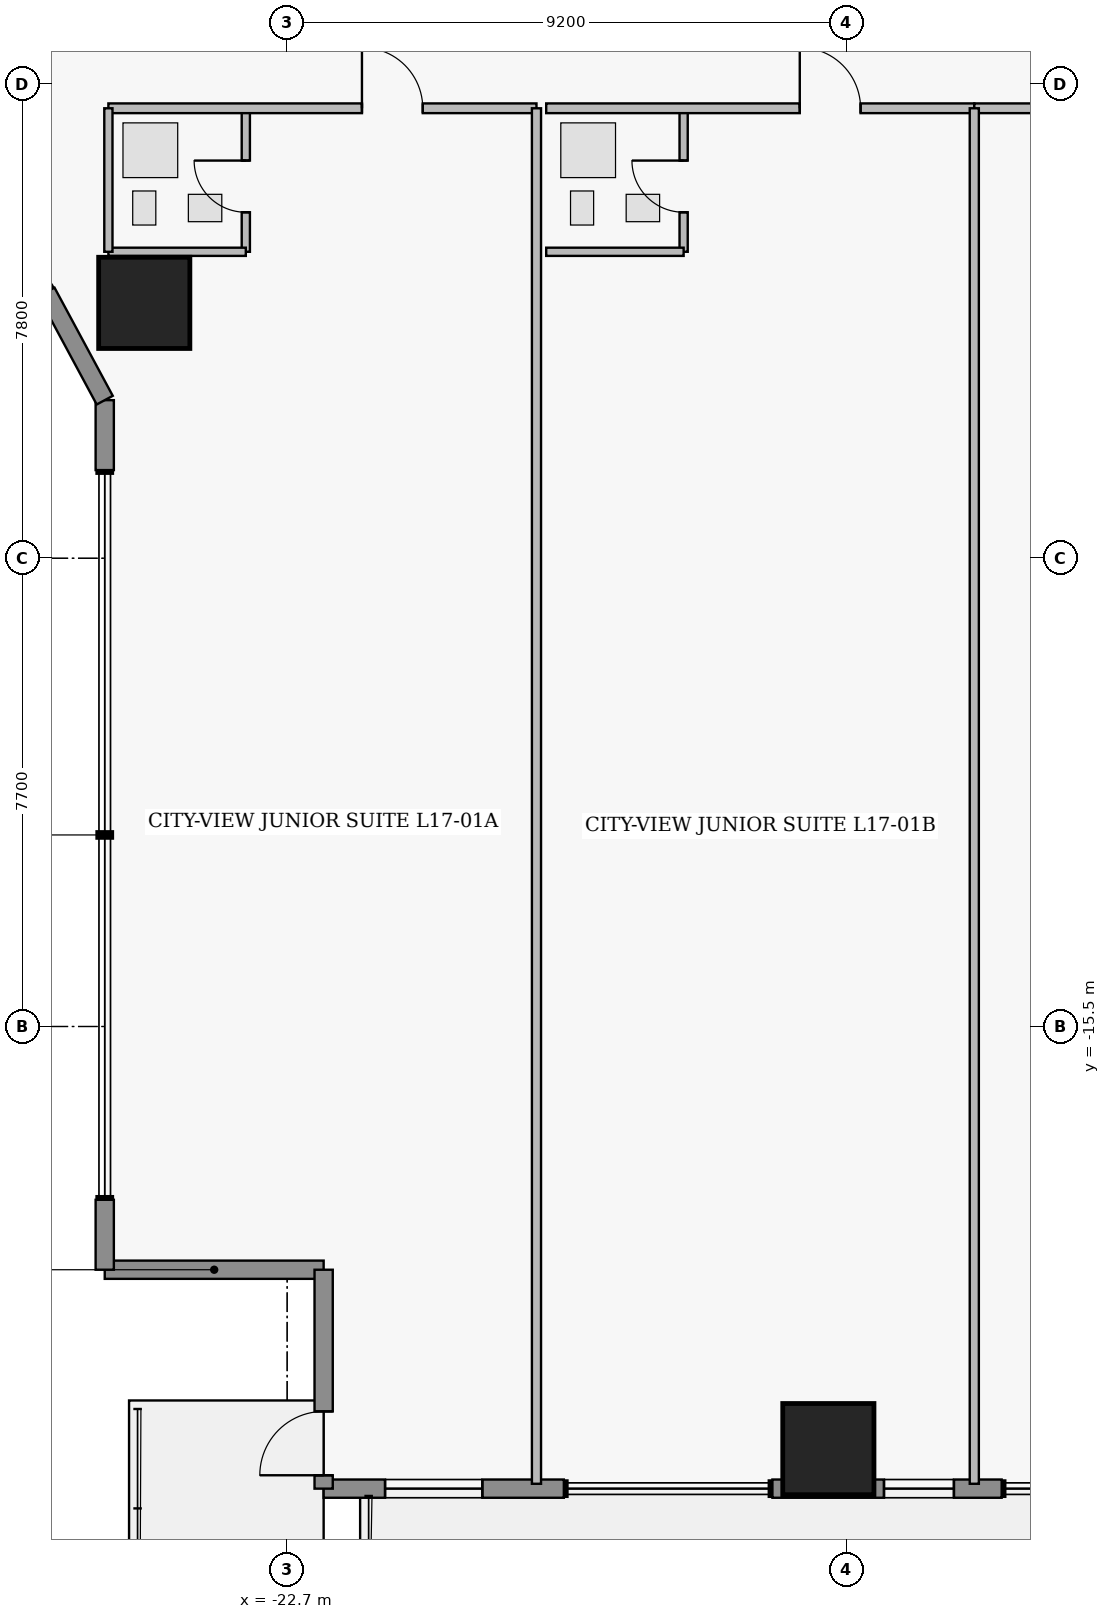
"""IFC4 building model, lengths in metres.
Left out: names, types, materials, properties, quantities, classifications, styles, units other than length and angle.
Written with IfcOpenShell. Run it as: python <this file> out.ifc"""

import sys

from ifc_helpers import new_model, si_unit, direction, frame, frame_2d, origin, origin_2d, place, context, subcontext, project, spatial, rectangle, extrude, element, fill, save


model = new_model("IFC4")
c1 = context("Model", 3, precision=1e-05, world=origin(), true_north=direction((0.0, 1.0)))
c2 = subcontext(c1, "Body", "Model", "MODEL_VIEW")
j1 = project(units=[si_unit("LENGTHUNIT", "METRE"), si_unit("PLANEANGLEUNIT", "RADIAN")], contexts=[c1])
p1 = place(None, origin())
s1 = spatial("IfcSite", under=j1, at=p1, CompositionType="ELEMENT")
p2 = place(p1, origin())
s2 = spatial("IfcBuilding", under=s1, at=p2, CompositionType="ELEMENT")
p3 = place(p2, frame((0.0, 0.0, 71.4)))
s3 = spatial("IfcBuildingStorey", under=s2, at=p3, CompositionType="ELEMENT", Elevation=71.4)
for number, where, z_axis, x_axis in (
    (1, (-13.8, -22.45, 0.0), (0.0, 0.0, 1.0), (1.0, 0.0, 0.0)),
    (2, (-25.05, -3.6, 0.0), (0.0, 0.0, 1.0), (1.0, 0.0, 0.0)),
):
    element("IfcColumn", number, at=place(p3, frame(where, z_axis=z_axis, x_axis=x_axis)), inside=s3, PredefinedType="COLUMN", context=c2, shape_type="SweptSolid", body=[
        extrude(rectangle(XDim=1.5, YDim=1.5, at=origin_2d()), origin(), (0.0, 0.0, 1.0), 3.65),
    ])
p4 = place(p3, frame((-22.1, -19.5, 0.0), z_axis=(0.0, 0.0, 1.0), x_axis=(-1.0, 0.0, 0.0)))
e3 = element("IfcWall", 3, at=p4, inside=s3, PredefinedType="STANDARD", context=c2, shape_type="SweptSolid", body=[
    extrude(rectangle(XDim=3.6, YDim=0.3, at=frame_2d((1.8, 0.0))), origin(), (0.0, 0.0, 1.0), 3.43),
])
p5 = place(p3, frame((-25.7, -19.5, 0.0), z_axis=(0.0, 0.0, 1.0), x_axis=(0.0, 1.0, 0.0)))
e4 = element("IfcWall", 4, at=p5, inside=s3, PredefinedType="STANDARD", context=c2, shape_type="SweptSolid", body=[
    extrude(rectangle(XDim=1.15, YDim=0.3, at=frame_2d((0.575, 0.0))), origin(), (0.0, 0.0, 1.0), 3.43),
])
p6 = place(p3, frame((-25.7, -6.35, 0.0), z_axis=(0.0, 0.0, 1.0), x_axis=(0.0, 1.0, 0.0)))
e5 = element("IfcWall", 5, at=p6, inside=s3, PredefinedType="STANDARD", context=c2, shape_type="SweptSolid", body=[
    extrude(rectangle(XDim=1.15, YDim=0.3, at=frame_2d((0.575, 0.0))), origin(), (0.0, 0.0, 1.0), 3.43),
])
p7 = place(p3, frame((-25.7, -5.2, 0.0), z_axis=(0.0, 0.0, 1.0), x_axis=(-0.474121438562, 0.88045946045, 0.0)))
e6 = element("IfcWall", 6, at=p7, inside=s3, PredefinedType="STANDARD", context=c2, shape_type="SweptSolid", body=[
    extrude(rectangle(XDim=2.021, YDim=0.3, at=frame_2d((1.01, 0.0))), origin(), (0.0, 0.0, 1.0), 3.43),
])
p8 = place(p3, frame((-28.5, 0.0, 0.0), z_axis=(0.0, 0.0, 1.0), x_axis=(0.474109683532, 0.880465790352, 0.0)))
e7 = element("IfcWall", 7, at=p8, inside=s3, PredefinedType="STANDARD", context=c2, shape_type="SweptSolid", body=[
    extrude(rectangle(XDim=5.906, YDim=0.3, at=frame_2d((2.953, 0.0))), origin(), (0.0, 0.0, 1.0), 3.43),
])
p9 = place(p8, frame((2.432, 0.0, 0.95)))
e8 = element("IfcOpeningElement", 8, at=p9, cuts=e7, PredefinedType="OPENING", context=c2, shape_type="SweptSolid", body=[
    extrude(rectangle(XDim=1.15, YDim=1.55, at=frame_2d((0.575, 0.775))), frame((0.0, 0.16, 0.0), z_axis=(0.0, -1.0, 0.0), x_axis=(1.0, 0.0, 0.0)), (0.0, 0.0, 1.0), 0.32),
])
p10 = place(p3, frame((-10.95, -23.1, 0.0), z_axis=(0.0, 0.0, 1.0), x_axis=(-1.0, 0.0, 0.0)))
e9 = element("IfcWall", 9, at=p10, inside=s3, PredefinedType="STANDARD", context=c2, shape_type="SweptSolid", body=[
    extrude(rectangle(XDim=3.77, YDim=0.3, at=frame_2d((1.885, 0.0))), origin(), (0.0, 0.0, 1.0), 3.43),
])
p11 = place(p10, frame((0.785, 0.0, 0.95)))
e10 = element("IfcOpeningElement", 10, at=p11, cuts=e9, PredefinedType="OPENING", context=c2, shape_type="SweptSolid", body=[
    extrude(rectangle(XDim=1.15, YDim=1.55, at=frame_2d((0.575, 0.775))), frame((0.0, 0.16, 0.0), z_axis=(0.0, -1.0, 0.0), x_axis=(1.0, 0.0, 0.0)), (0.0, 0.0, 1.0), 0.32),
])
p12 = place(p3, frame((-18.15, -23.1, 0.0), z_axis=(0.0, 0.0, 1.0), x_axis=(-1.0, 0.0, 0.0)))
e11 = element("IfcWall", 11, at=p12, inside=s3, PredefinedType="STANDARD", context=c2, shape_type="SweptSolid", body=[
    extrude(rectangle(XDim=3.95, YDim=0.3, at=frame_2d((1.975, 0.0))), origin(), (0.0, 0.0, 1.0), 3.43),
])
p13 = place(p12, frame((1.34, 0.0, 0.85)))
e12 = element("IfcOpeningElement", 12, at=p13, cuts=e11, PredefinedType="OPENING", context=c2, shape_type="SweptSolid", body=[
    extrude(rectangle(XDim=1.6, YDim=1.8, at=frame_2d((0.8, 0.9))), frame((0.0, 0.16, 0.0), z_axis=(0.0, -1.0, 0.0), x_axis=(1.0, 0.0, 0.0)), (0.0, 0.0, 1.0), 0.32),
])
p14 = place(p3, frame((-22.1, -23.1, 0.0), z_axis=(0.0, 0.0, 1.0), x_axis=(0.0, 1.0, 0.0)))
e13 = element("IfcWall", 13, at=p14, inside=s3, PredefinedType="STANDARD", context=c2, shape_type="SweptSolid", body=[
    extrude(rectangle(XDim=3.6, YDim=0.3, at=frame_2d((1.8, 0.0))), origin(), (0.0, 0.0, 1.0), 3.43),
])
p15 = place(p14, frame((0.22, 0.0, 0.0)))
e14 = element("IfcOpeningElement", 14, at=p15, cuts=e13, PredefinedType="OPENING", context=c2, shape_type="SweptSolid", body=[
    extrude(rectangle(XDim=1.05, YDim=2.2, at=frame_2d((0.525, 1.1))), frame((0.0, 0.16, 0.0), z_axis=(0.0, -1.0, 0.0), x_axis=(1.0, 0.0, 0.0)), (0.0, 0.0, 1.0), 0.32),
])
p16 = place(p3, frame((-23.38, -2.76, 0.0), z_axis=(0.0, 0.0, 1.0), x_axis=(0.0, 1.0, 0.0)))
e15 = element("IfcWall", 15, at=p16, inside=s3, PredefinedType="PLUMBINGWALL", context=c2, shape_type="SweptSolid", body=[
    extrude(rectangle(XDim=2.36, YDim=0.135, at=frame_2d((1.18, 0.0))), origin(), (0.0, 0.0, 1.0), 3.43),
])
p17 = place(p16, frame((0.65, 0.0, 0.0)))
e16 = element("IfcOpeningElement", 16, at=p17, cuts=e15, PredefinedType="OPENING", context=c2, shape_type="SweptSolid", body=[
    extrude(rectangle(XDim=0.85, YDim=2.1, at=frame_2d((0.425, 1.05))), frame((0.0, 0.077, 0.0), z_axis=(0.0, -1.0, 0.0), x_axis=(1.0, 0.0, 0.0)), (0.0, 0.0, 1.0), 0.155),
])
p18 = place(p3, frame((-25.64, -0.4, 0.0), z_axis=(0.0, 0.0, 1.0), x_axis=(1.0, 0.0, 0.0)))
e17 = element("IfcWall", 17, at=p18, inside=s3, PredefinedType="PARTITIONING", context=c2, shape_type="SweptSolid", body=[
    extrude(rectangle(XDim=7.04, YDim=0.16, at=frame_2d((3.52, 0.0))), origin(), (0.0, 0.0, 1.0), 3.43),
])
p19 = place(p18, frame((4.17, 0.0, 0.0)))
e18 = element("IfcOpeningElement", 18, at=p19, cuts=e17, PredefinedType="OPENING", context=c2, shape_type="SweptSolid", body=[
    extrude(rectangle(XDim=1.0, YDim=2.15, at=frame_2d((0.5, 1.075))), frame((0.0, 0.09, 0.0), z_axis=(0.0, -1.0, 0.0), x_axis=(1.0, 0.0, 0.0)), (0.0, 0.0, 1.0), 0.18),
])
p20 = place(p3, frame((-16.18, -2.76, 0.0), z_axis=(0.0, 0.0, 1.0), x_axis=(0.0, 1.0, 0.0)))
e19 = element("IfcWall", 19, at=p20, inside=s3, PredefinedType="PLUMBINGWALL", context=c2, shape_type="SweptSolid", body=[
    extrude(rectangle(XDim=2.36, YDim=0.135, at=frame_2d((1.18, 0.0))), origin(), (0.0, 0.0, 1.0), 3.43),
])
p21 = place(p20, frame((0.65, 0.0, 0.0)))
e20 = element("IfcOpeningElement", 20, at=p21, cuts=e19, PredefinedType="OPENING", context=c2, shape_type="SweptSolid", body=[
    extrude(rectangle(XDim=0.85, YDim=2.1, at=frame_2d((0.425, 1.05))), frame((0.0, 0.077, 0.0), z_axis=(0.0, -1.0, 0.0), x_axis=(1.0, 0.0, 0.0)), (0.0, 0.0, 1.0), 0.155),
])
p22 = place(p3, frame((-18.44, -0.4, 0.0), z_axis=(0.0, 0.0, 1.0), x_axis=(1.0, 0.0, 0.0)))
e21 = element("IfcWall", 21, at=p22, inside=s3, PredefinedType="PARTITIONING", context=c2, shape_type="SweptSolid", body=[
    extrude(rectangle(XDim=7.04, YDim=0.16, at=frame_2d((3.52, 0.0))), origin(), (0.0, 0.0, 1.0), 3.43),
])
p23 = place(p22, frame((4.17, 0.0, 0.0)))
e22 = element("IfcOpeningElement", 22, at=p23, cuts=e21, PredefinedType="OPENING", context=c2, shape_type="SweptSolid", body=[
    extrude(rectangle(XDim=1.0, YDim=2.15, at=frame_2d((0.5, 1.075))), frame((0.0, 0.09, 0.0), z_axis=(0.0, -1.0, 0.0), x_axis=(1.0, 0.0, 0.0)), (0.0, 0.0, 1.0), 0.18),
])
p24 = place(p3, frame((-11.4, -0.4, 0.0), z_axis=(0.0, 0.0, 1.0), x_axis=(1.0, 0.0, 0.0)))
e23 = element("IfcWall", 23, at=p24, inside=s3, PredefinedType="PARTITIONING", context=c2, shape_type="SweptSolid", body=[
    extrude(rectangle(XDim=22.8, YDim=0.16, at=frame_2d((11.4, 0.0))), origin(), (0.0, 0.0, 1.0), 3.43),
])
p25 = place(p24, frame((10.86, 0.0, 0.0)))
e24 = element("IfcOpeningElement", 24, at=p25, cuts=e23, PredefinedType="OPENING", context=c2, shape_type="SweptSolid", body=[
    extrude(rectangle(XDim=1.08, YDim=2.18, at=frame_2d((0.54, 1.09))), frame((0.0, 0.09, 0.0), z_axis=(0.0, -1.0, 0.0), x_axis=(1.0, 0.0, 0.0)), (0.0, 0.0, 1.0), 0.18),
])
p26 = place(p3, frame((-25.64, -2.76, 0.0), z_axis=(0.0, 0.0, 1.0), x_axis=(1.0, 0.0, 0.0)))
e25 = element("IfcWall", 25, at=p26, inside=s3, PredefinedType="PLUMBINGWALL", context=c2, shape_type="SweptSolid", body=[
    extrude(rectangle(XDim=2.26, YDim=0.135, at=frame_2d((1.13, 0.0))), origin(), (0.0, 0.0, 1.0), 3.43),
])
p27 = place(p3, frame((-25.64, -2.76, 0.0), z_axis=(0.0, 0.0, 1.0), x_axis=(0.0, 1.0, 0.0)))
e26 = element("IfcWall", 26, at=p27, inside=s3, PredefinedType="PLUMBINGWALL", context=c2, shape_type="SweptSolid", body=[
    extrude(rectangle(XDim=2.36, YDim=0.135, at=frame_2d((1.18, 0.0))), origin(), (0.0, 0.0, 1.0), 3.43),
])
p28 = place(p3, frame((-18.6, -23.02, 0.0), z_axis=(0.0, 0.0, 1.0), x_axis=(0.0, 1.0, 0.0)))
e27 = element("IfcWall", 27, at=p28, inside=s3, PredefinedType="PARTITIONING", context=c2, shape_type="SweptSolid", body=[
    extrude(rectangle(XDim=22.62, YDim=0.15, at=frame_2d((11.31, 0.0))), origin(), (0.0, 0.0, 1.0), 3.43),
])
p29 = place(p3, frame((-18.44, -2.76, 0.0), z_axis=(0.0, 0.0, 1.0), x_axis=(1.0, 0.0, 0.0)))
e28 = element("IfcWall", 28, at=p29, inside=s3, PredefinedType="PLUMBINGWALL", context=c2, shape_type="SweptSolid", body=[
    extrude(rectangle(XDim=2.26, YDim=0.135, at=frame_2d((1.13, 0.0))), origin(), (0.0, 0.0, 1.0), 3.43),
])
p30 = place(p3, frame((-11.4, -23.02, 0.0), z_axis=(0.0, 0.0, 1.0), x_axis=(0.0, 1.0, 0.0)))
e29 = element("IfcWall", 29, at=p30, inside=s3, PredefinedType="PARTITIONING", context=c2, shape_type="SweptSolid", body=[
    extrude(rectangle(XDim=22.62, YDim=0.15, at=frame_2d((11.31, 0.0))), origin(), (0.0, 0.0, 1.0), 3.43),
])
p31 = place(p11, origin())
e30 = element("IfcWindow", 30, at=p31, inside=s3, PartitioningType="SINGLE_PANEL", PredefinedType="WINDOW", context=c2, shape_type="SweptSolid", body=[
    extrude(rectangle(XDim=1.15, YDim=1.55, at=frame_2d((0.575, 0.775))), frame((0.0, 0.03, 0.0), z_axis=(0.0, -1.0, 0.0), x_axis=(1.0, 0.0, 0.0)), (0.0, 0.0, 1.0), 0.06),
])
fill(e10, e30)
p32 = place(p13, origin())
e31 = element("IfcWindow", 31, at=p32, inside=s3, PartitioningType="SINGLE_PANEL", PredefinedType="WINDOW", context=c2, shape_type="SweptSolid", body=[
    extrude(rectangle(XDim=1.6, YDim=1.8, at=frame_2d((0.8, 0.9))), frame((0.0, 0.03, 0.0), z_axis=(0.0, -1.0, 0.0), x_axis=(1.0, 0.0, 0.0)), (0.0, 0.0, 1.0), 0.06),
])
fill(e12, e31)
p33 = place(p15, origin())
e32 = element("IfcDoor", 32, at=p33, inside=s3, OperationType="SINGLE_SWING_LEFT", PredefinedType="DOOR", context=c2, shape_type="SweptSolid", body=[
    extrude(rectangle(XDim=1.05, YDim=2.2, at=frame_2d((0.525, 1.1))), frame((0.0, 0.025, 0.0), z_axis=(0.0, -1.0, 0.0), x_axis=(1.0, 0.0, 0.0)), (0.0, 0.0, 1.0), 0.05),
])
fill(e14, e32)
p34 = place(p17, origin())
e33 = element("IfcDoor", 33, at=p34, inside=s3, OperationType="SINGLE_SWING_RIGHT", PredefinedType="DOOR", context=c2, shape_type="SweptSolid", body=[
    extrude(rectangle(XDim=0.85, YDim=2.1, at=frame_2d((0.425, 1.05))), frame((0.0, 0.025, 0.0), z_axis=(0.0, -1.0, 0.0), x_axis=(1.0, 0.0, 0.0)), (0.0, 0.0, 1.0), 0.05),
])
fill(e16, e33)
p35 = place(p19, origin())
e34 = element("IfcDoor", 34, at=p35, inside=s3, OperationType="SINGLE_SWING_LEFT", PredefinedType="DOOR", context=c2, shape_type="SweptSolid", body=[
    extrude(rectangle(XDim=1.0, YDim=2.15, at=frame_2d((0.5, 1.075))), frame((0.0, 0.025, 0.0), z_axis=(0.0, -1.0, 0.0), x_axis=(1.0, 0.0, 0.0)), (0.0, 0.0, 1.0), 0.05),
])
fill(e18, e34)
p36 = place(p21, origin())
e35 = element("IfcDoor", 35, at=p36, inside=s3, OperationType="SINGLE_SWING_RIGHT", PredefinedType="DOOR", context=c2, shape_type="SweptSolid", body=[
    extrude(rectangle(XDim=0.85, YDim=2.1, at=frame_2d((0.425, 1.05))), frame((0.0, 0.025, 0.0), z_axis=(0.0, -1.0, 0.0), x_axis=(1.0, 0.0, 0.0)), (0.0, 0.0, 1.0), 0.05),
])
fill(e20, e35)
p37 = place(p23, origin())
e36 = element("IfcDoor", 36, at=p37, inside=s3, OperationType="SINGLE_SWING_LEFT", PredefinedType="DOOR", context=c2, shape_type="SweptSolid", body=[
    extrude(rectangle(XDim=1.0, YDim=2.15, at=frame_2d((0.5, 1.075))), frame((0.0, 0.025, 0.0), z_axis=(0.0, -1.0, 0.0), x_axis=(1.0, 0.0, 0.0)), (0.0, 0.0, 1.0), 0.05),
])
fill(e22, e36)
save(model, sys.argv[1])
